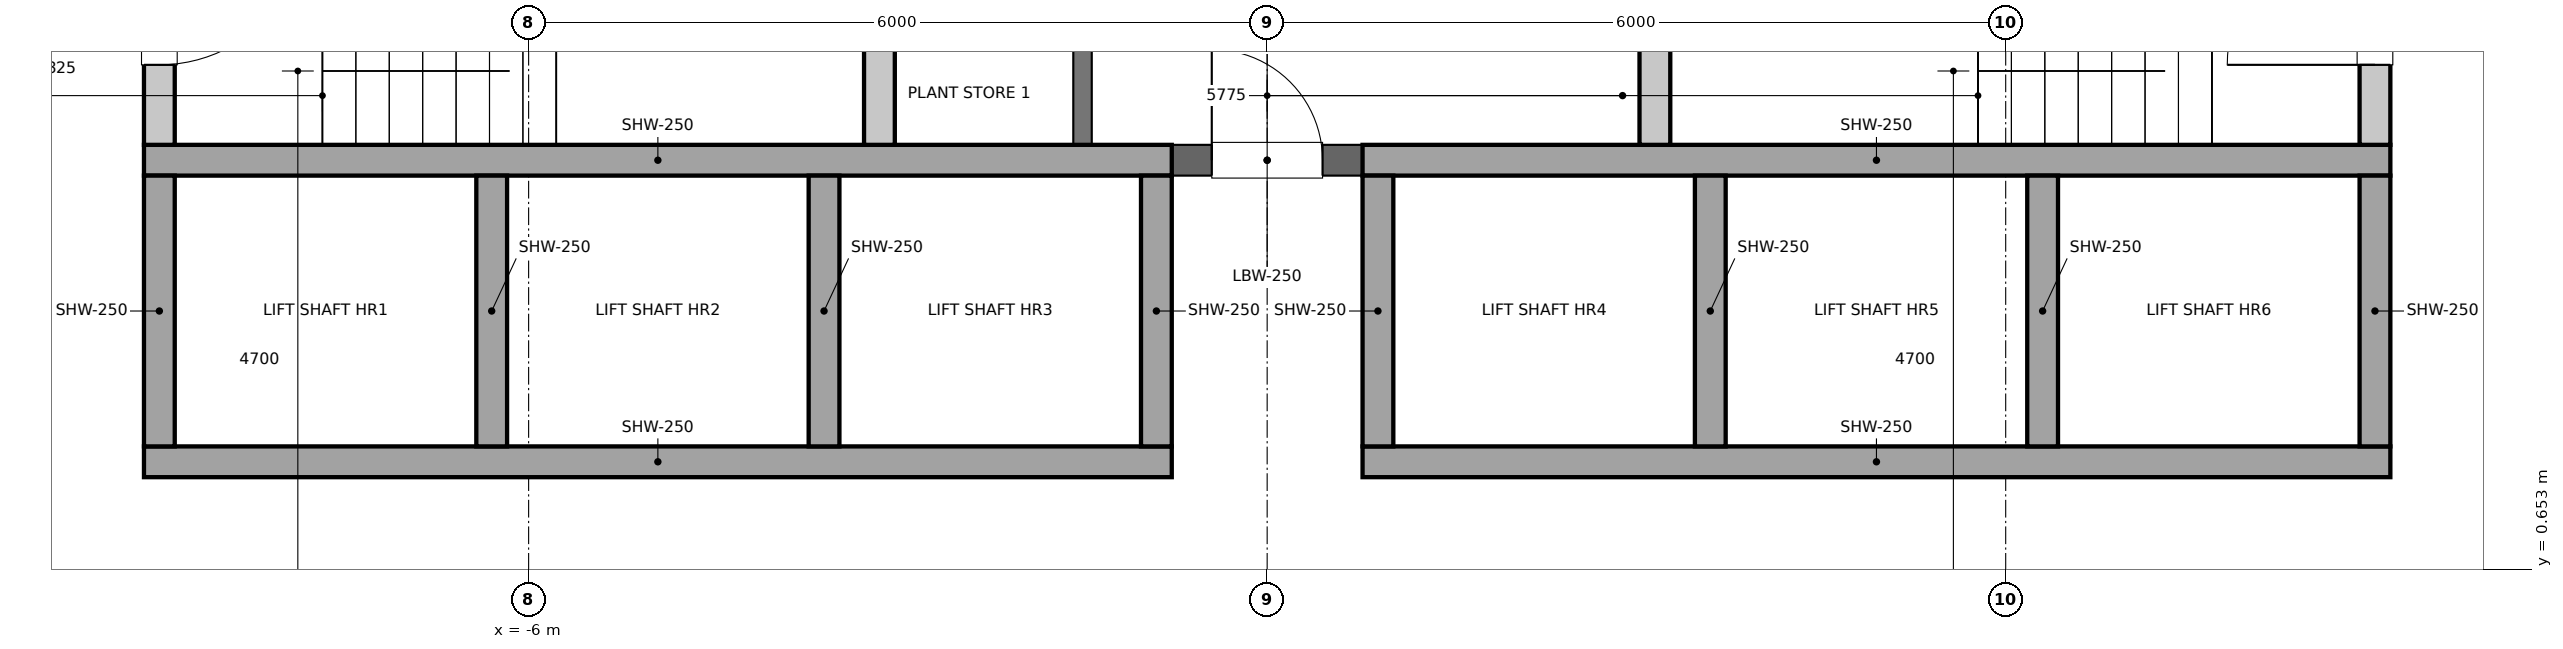
"""IFC4 building model, lengths in metres.
Left out: names, types, materials, properties, quantities, classifications, styles, units other than length and angle.
Written with IfcOpenShell. Run it as: python <this file> out.ifc"""

import sys

from ifc_helpers import new_model, si_unit, direction, frame, frame_2d, origin, place, context, subcontext, project, spatial, rectangle, extrude, element, fill, save


model = new_model("IFC4")
c1 = context("Model", 3, precision=1e-05, world=origin(), true_north=direction((0.0, 1.0)))
c2 = subcontext(c1, "Body", "Model", "MODEL_VIEW")
j1 = project(units=[si_unit("LENGTHUNIT", "METRE"), si_unit("PLANEANGLEUNIT", "RADIAN")], contexts=[c1])
p1 = place(None, origin())
s1 = spatial("IfcSite", under=j1, at=p1, CompositionType="ELEMENT")
p2 = place(p1, origin())
s2 = spatial("IfcBuilding", under=s1, at=p2, CompositionType="ELEMENT")
p3 = place(p2, frame((0.0, 0.0, 299.0)))
s3 = spatial("IfcBuildingStorey", under=s2, at=p3, CompositionType="ELEMENT", Elevation=299.0)
p4 = place(p3, frame((-1.5, 4.1, 0.0), z_axis=(0.0, 0.0, 1.0), x_axis=(0.0, 1.0, 0.0)))
e1 = element("IfcWall", 1, at=p4, inside=s3, PredefinedType="PARTITIONING", context=c2, shape_type="SweptSolid", body=[
    extrude(rectangle(XDim=2.5, YDim=0.15, at=frame_2d((1.25, 0.0))), origin(), (0.0, 0.0, 1.0), 5.25),
])
p5 = place(p4, frame((0.8, 0.0, 0.0)))
e2 = element("IfcOpeningElement", 2, at=p5, cuts=e1, PredefinedType="OPENING", context=c2, shape_type="SweptSolid", body=[
    extrude(rectangle(XDim=0.9, YDim=2.1, at=frame_2d((0.45, 1.05))), frame((0.0, 0.075, 0.0), z_axis=(0.0, -1.0, 0.0), x_axis=(1.0, 0.0, 0.0)), (0.0, 0.0, 1.0), 0.15),
])
p6 = place(p3, frame((-9.0, 4.1, 0.0), z_axis=(0.0, 0.0, 1.0), x_axis=(0.0, 1.0, 0.0)))
e3 = element("IfcWall", 3, at=p6, inside=s3, PredefinedType="SOLIDWALL", context=c2, shape_type="SweptSolid", body=[
    extrude(rectangle(XDim=2.5, YDim=0.25, at=frame_2d((1.25, 0.0))), origin(), (0.0, 0.0, 1.0), 5.25),
])
p7 = place(p6, frame((0.65, 0.0, 0.0)))
e4 = element("IfcOpeningElement", 4, at=p7, cuts=e3, PredefinedType="OPENING", context=c2, shape_type="SweptSolid", body=[
    extrude(rectangle(XDim=1.2, YDim=2.1, at=frame_2d((0.6, 1.05))), frame((0.0, 0.125, 0.0), z_axis=(0.0, -1.0, 0.0), x_axis=(1.0, 0.0, 0.0)), (0.0, 0.0, 1.0), 0.25),
])
p8 = place(p3, frame((9.0, 4.1, 0.0), z_axis=(0.0, 0.0, 1.0), x_axis=(0.0, 1.0, 0.0)))
e5 = element("IfcWall", 5, at=p8, inside=s3, PredefinedType="SOLIDWALL", context=c2, shape_type="SweptSolid", body=[
    extrude(rectangle(XDim=2.5, YDim=0.25, at=frame_2d((1.25, 0.0))), origin(), (0.0, 0.0, 1.0), 5.25),
])
p9 = place(p8, frame((0.65, 0.0, 0.0)))
e6 = element("IfcOpeningElement", 6, at=p9, cuts=e5, PredefinedType="OPENING", context=c2, shape_type="SweptSolid", body=[
    extrude(rectangle(XDim=1.2, YDim=2.1, at=frame_2d((0.6, 1.05))), frame((0.0, 0.125, 0.0), z_axis=(0.0, -1.0, 0.0), x_axis=(1.0, 0.0, 0.0)), (0.0, 0.0, 1.0), 0.25),
])
for number, where, z_axis, x_axis in (
    (7, (-3.15, 4.1, 0.0), (0.0, 0.0, 1.0), (0.0, 1.0, 0.0)),
    (8, (3.15, 4.1, 0.0), (0.0, 0.0, 1.0), (0.0, 1.0, 0.0)),
):
    element("IfcWall", number, at=place(p3, frame(where, z_axis=z_axis, x_axis=x_axis)), inside=s3, PredefinedType="SOLIDWALL", context=c2, shape_type="SweptSolid", body=[
        extrude(rectangle(XDim=2.5, YDim=0.25, at=frame_2d((1.25, 0.0))), origin(), (0.0, 0.0, 1.0), 5.25),
    ])
p10 = place(p3, frame((-0.775, 3.975, 0.0), z_axis=(0.0, 0.0, 1.0), x_axis=(1.0, 0.0, 0.0)))
e9 = element("IfcWall", 9, at=p10, inside=s3, PredefinedType="PARTITIONING", context=c2, shape_type="SweptSolid", body=[
    extrude(rectangle(XDim=1.55, YDim=0.25, at=frame_2d((0.775, 0.0))), origin(), (0.0, 0.0, 1.0), 5.25),
])
p11 = place(p10, frame((0.325, 0.0, 0.0)))
e10 = element("IfcOpeningElement", 10, at=p11, cuts=e9, PredefinedType="OPENING", context=c2, shape_type="SweptSolid", body=[
    extrude(rectangle(XDim=0.9, YDim=2.1, at=frame_2d((0.45, 1.05))), frame((0.0, 0.125, 0.0), z_axis=(0.0, -1.0, 0.0), x_axis=(1.0, 0.0, 0.0)), (0.0, 0.0, 1.0), 0.25),
])
for number, where, z_axis, x_axis in (
    (11, (-9.125, 1.525, 0.0), (0.0, 0.0, 1.0), (1.0, 0.0, 0.0)),
    (12, (0.775, 1.525, 0.0), (0.0, 0.0, 1.0), (1.0, 0.0, 0.0)),
    (13, (-9.125, 3.975, 0.0), (0.0, 0.0, 1.0), (1.0, 0.0, 0.0)),
    (14, (0.775, 3.975, 0.0), (0.0, 0.0, 1.0), (1.0, 0.0, 0.0)),
):
    element("IfcWall", number, at=place(p3, frame(where, z_axis=z_axis, x_axis=x_axis)), inside=s3, PredefinedType="SOLIDWALL", context=c2, shape_type="SweptSolid", body=[
        extrude(rectangle(XDim=8.35, YDim=0.25, at=frame_2d((4.175, 0.0))), origin(), (0.0, 0.0, 1.0), 5.25),
    ])
for number, where, z_axis, x_axis in (
    (15, (-9.0, 1.65, 0.0), (0.0, 0.0, 1.0), (0.0, 1.0, 0.0)),
    (16, (9.0, 1.65, 0.0), (0.0, 0.0, 1.0), (0.0, 1.0, 0.0)),
    (17, (-6.3, 1.65, 0.0), (0.0, 0.0, 1.0), (0.0, 1.0, 0.0)),
    (18, (6.3, 1.65, 0.0), (0.0, 0.0, 1.0), (0.0, 1.0, 0.0)),
    (19, (-3.6, 1.65, 0.0), (0.0, 0.0, 1.0), (0.0, 1.0, 0.0)),
    (20, (3.6, 1.65, 0.0), (0.0, 0.0, 1.0), (0.0, 1.0, 0.0)),
    (21, (-0.9, 1.65, 0.0), (0.0, 0.0, 1.0), (0.0, 1.0, 0.0)),
    (22, (0.9, 1.65, 0.0), (0.0, 0.0, 1.0), (0.0, 1.0, 0.0)),
):
    element("IfcWall", number, at=place(p3, frame(where, z_axis=z_axis, x_axis=x_axis)), inside=s3, PredefinedType="SOLIDWALL", context=c2, shape_type="SweptSolid", body=[
        extrude(rectangle(XDim=2.2, YDim=0.25, at=frame_2d((1.1, 0.0))), origin(), (0.0, 0.0, 1.0), 5.25),
    ])
p12 = place(p7, origin())
e23 = element("IfcDoor", 23, at=p12, inside=s3, OperationType="SINGLE_SWING_RIGHT", PredefinedType="DOOR", context=c2, shape_type="SweptSolid", body=[
    extrude(rectangle(XDim=1.2, YDim=2.1, at=frame_2d((0.6, 1.05))), frame((0.0, 0.025, 0.0), z_axis=(0.0, -1.0, 0.0), x_axis=(1.0, 0.0, 0.0)), (0.0, 0.0, 1.0), 0.05),
])
fill(e4, e23)
p13 = place(p9, origin())
e24 = element("IfcDoor", 24, at=p13, inside=s3, OperationType="SINGLE_SWING_LEFT", PredefinedType="DOOR", context=c2, shape_type="SweptSolid", body=[
    extrude(rectangle(XDim=1.2, YDim=2.1, at=frame_2d((0.6, 1.05))), frame((0.0, 0.025, 0.0), z_axis=(0.0, -1.0, 0.0), x_axis=(1.0, 0.0, 0.0)), (0.0, 0.0, 1.0), 0.05),
])
fill(e6, e24)
p14 = place(p11, origin())
e25 = element("IfcDoor", 25, at=p14, inside=s3, OperationType="SINGLE_SWING_LEFT", PredefinedType="DOOR", context=c2, shape_type="SweptSolid", body=[
    extrude(rectangle(XDim=0.9, YDim=2.1, at=frame_2d((0.45, 1.05))), frame((0.0, 0.025, 0.0), z_axis=(0.0, -1.0, 0.0), x_axis=(1.0, 0.0, 0.0)), (0.0, 0.0, 1.0), 0.05),
])
fill(e10, e25)
save(model, sys.argv[1])
